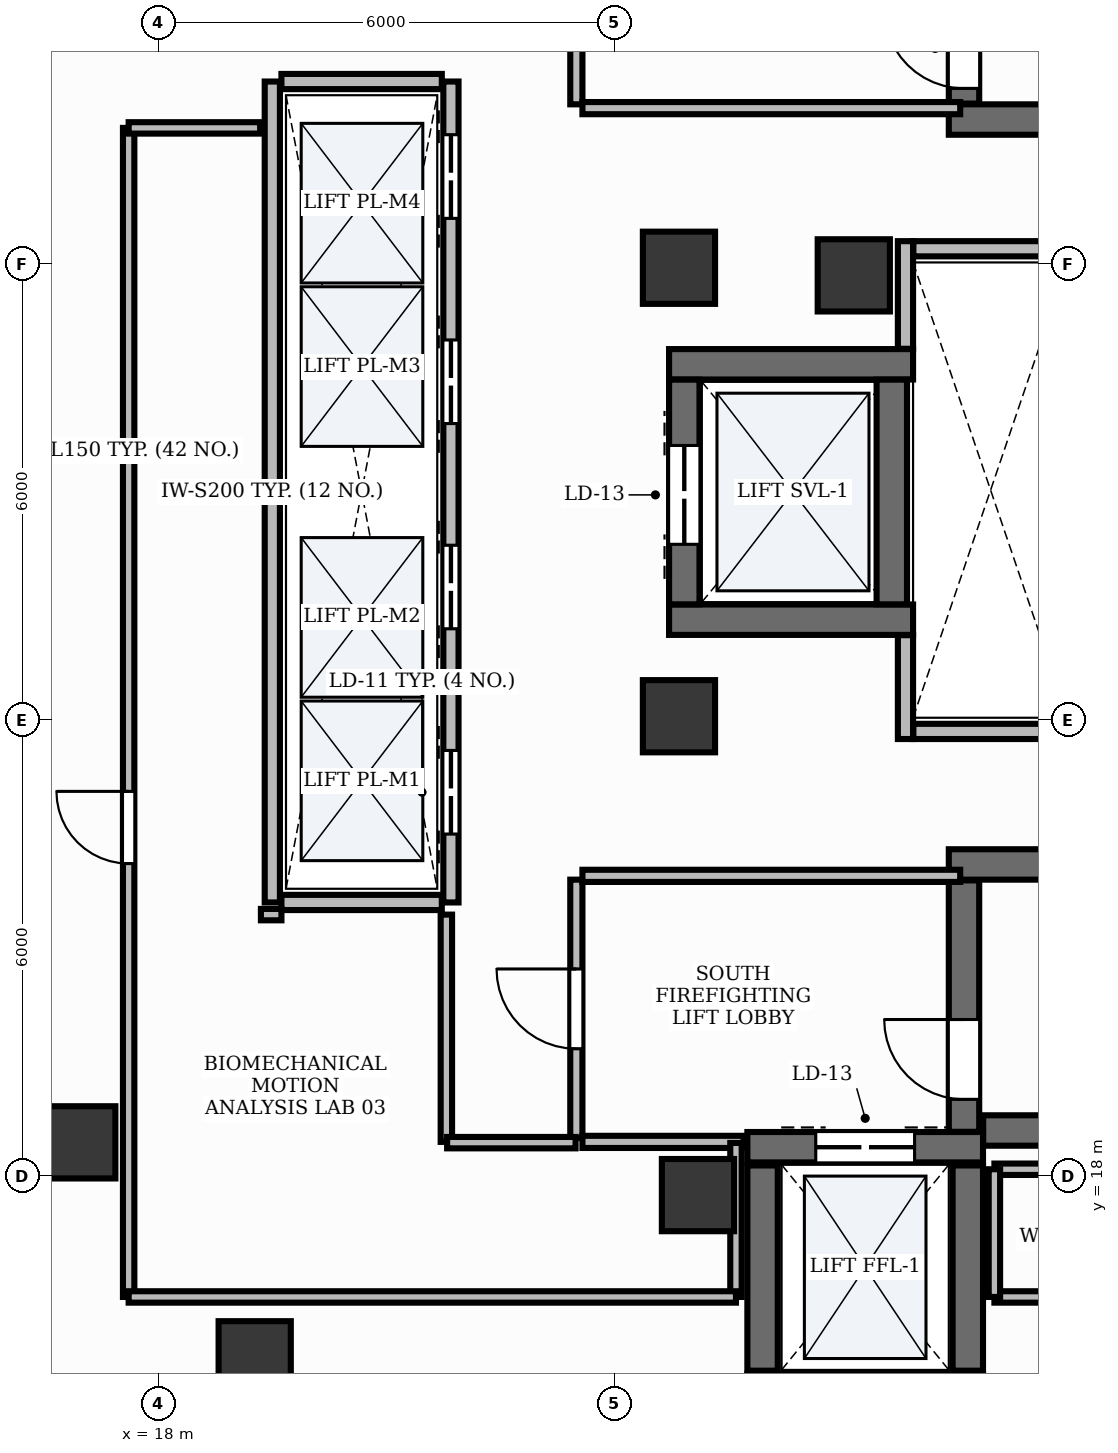
"""IFC4 building model, lengths in metres.
Left out: names, types, materials, properties, quantities, classifications, styles, units other than length and angle.
Written with IfcOpenShell. Run it as: python <this file> out.ifc"""

import sys

from ifc_helpers import new_model, si_unit, direction, frame, frame_2d, origin, origin_2d, place, context, subcontext, project, spatial, rectangle, extrude, element, fill, save


model = new_model("IFC4")
c1 = context("Model", 3, precision=1e-05, world=origin(), true_north=direction((0.0, 1.0)))
c2 = subcontext(c1, "Body", "Model", "MODEL_VIEW")
j1 = project(units=[si_unit("LENGTHUNIT", "METRE"), si_unit("PLANEANGLEUNIT", "RADIAN")], contexts=[c1])
p1 = place(None, origin())
s1 = spatial("IfcSite", under=j1, at=p1, CompositionType="ELEMENT")
p2 = place(p1, origin())
s2 = spatial("IfcBuilding", under=s1, at=p2, CompositionType="ELEMENT")
p3 = place(p2, frame((0.0, 0.0, 239.4)))
s3 = spatial("IfcBuildingStorey", under=s2, at=p3, CompositionType="ELEMENT", Elevation=239.4)
p4 = place(p3, frame((28.4, 31.9, 0.0), z_axis=(0.0, 0.0, 1.0), x_axis=(1.0, 0.0, 0.0)))
e1 = element("IfcWall", 1, at=p4, inside=s3, PredefinedType="SHEAR", context=c2, shape_type="SweptSolid", body=[
    extrude(rectangle(XDim=8.65, YDim=0.4, at=frame_2d((4.325, 0.0))), origin(), (0.0, 0.0, 1.0), 3.9),
])
p5 = place(p3, frame((28.6, 32.11, 0.0), z_axis=(0.0, 0.0, 1.0), x_axis=(0.0, 1.0, 0.0)))
e2 = element("IfcWall", 2, at=p5, inside=s3, PredefinedType="SHEAR", context=c2, shape_type="SweptSolid", body=[
    extrude(rectangle(XDim=3.308, YDim=0.4, at=frame_2d((1.654, 0.0))), origin(), (0.0, 0.0, 1.0), 3.9),
])
p6 = place(p5, frame((0.2, 0.0, 0.0)))
e3 = element("IfcOpeningElement", 3, at=p6, cuts=e2, PredefinedType="OPENING", context=c2, shape_type="SweptSolid", body=[
    extrude(rectangle(XDim=1.05, YDim=2.15, at=frame_2d((0.525, 1.075))), frame((0.0, 0.215, 0.0), z_axis=(0.0, -1.0, 0.0), x_axis=(1.0, 0.0, 0.0)), (0.0, 0.0, 1.0), 0.43),
])
p7 = place(p3, frame((28.852, 18.6, 0.0), z_axis=(0.0, 0.0, 1.0), x_axis=(1.0, 0.0, 0.0)))
e4 = element("IfcWall", 4, at=p7, inside=s3, PredefinedType="SHEAR", context=c2, shape_type="SweptSolid", body=[
    extrude(rectangle(XDim=8.198, YDim=0.4, at=frame_2d((4.099, 0.0))), origin(), (0.0, 0.0, 1.0), 3.9),
])
p8 = place(p3, frame((28.4, 22.1, 0.0), z_axis=(0.0, 0.0, 1.0), x_axis=(1.0, 0.0, 0.0)))
e5 = element("IfcWall", 5, at=p8, inside=s3, PredefinedType="SHEAR", context=c2, shape_type="SweptSolid", body=[
    extrude(rectangle(XDim=8.65, YDim=0.4, at=frame_2d((4.325, 0.0))), origin(), (0.0, 0.0, 1.0), 3.9),
])
p9 = place(p3, frame((28.6, 18.582, 0.0), z_axis=(0.0, 0.0, 1.0), x_axis=(0.0, 1.0, 0.0)))
e6 = element("IfcWall", 6, at=p9, inside=s3, PredefinedType="SHEAR", context=c2, shape_type="SweptSolid", body=[
    extrude(rectangle(XDim=3.308, YDim=0.4, at=frame_2d((1.654, 0.0))), origin(), (0.0, 0.0, 1.0), 3.9),
])
p10 = place(p9, frame((0.428, 0.0, 0.0)))
e7 = element("IfcOpeningElement", 7, at=p10, cuts=e6, PredefinedType="OPENING", context=c2, shape_type="SweptSolid", body=[
    extrude(rectangle(XDim=1.05, YDim=2.15, at=frame_2d((0.525, 1.075))), frame((0.0, 0.215, 0.0), z_axis=(0.0, -1.0, 0.0), x_axis=(1.0, 0.0, 0.0)), (0.0, 0.0, 1.0), 0.43),
])
p11 = place(p3, frame((25.75, 18.38, 0.0), z_axis=(0.0, 0.0, 1.0), x_axis=(1.0, 0.0, 0.0)))
e8 = element("IfcWall", 8, at=p11, inside=s3, PredefinedType="SHEAR", context=c2, shape_type="SweptSolid", body=[
    extrude(rectangle(XDim=3.1, YDim=0.4, at=frame_2d((1.55, 0.0))), origin(), (0.0, 0.0, 1.0), 3.9),
])
p12 = place(p11, frame((0.9, 0.0, 0.0)))
e9 = element("IfcOpeningElement", 9, at=p12, cuts=e8, PredefinedType="OPENING", context=c2, shape_type="SweptSolid", body=[
    extrude(rectangle(XDim=1.3, YDim=2.2, at=frame_2d((0.65, 1.1))), frame((0.0, 0.215, 0.0), z_axis=(0.0, -1.0, 0.0), x_axis=(1.0, 0.0, 0.0)), (0.0, 0.0, 1.0), 0.43),
])
for number, where, z_axis, x_axis in (
    (10, (25.95, 15.44, 0.0), (0.0, 0.0, 1.0), (0.0, 1.0, 0.0)),
    (11, (28.65, 15.44, 0.0), (0.0, 0.0, 1.0), (0.0, 1.0, 0.0)),
):
    element("IfcWall", number, at=place(p3, frame(where, z_axis=z_axis, x_axis=x_axis)), inside=s3, PredefinedType="SHEAR", context=c2, shape_type="SweptSolid", body=[
        extrude(rectangle(XDim=2.7, YDim=0.4, at=frame_2d((1.35, 0.0))), origin(), (0.0, 0.0, 1.0), 3.9),
    ])
for number, where, z_axis, x_axis in (
    (12, (24.72, 28.68, 0.0), (0.0, 0.0, 1.0), (1.0, 0.0, 0.0)),
    (13, (24.72, 25.32, 0.0), (0.0, 0.0, 1.0), (1.0, 0.0, 0.0)),
):
    element("IfcWall", number, at=place(p3, frame(where, z_axis=z_axis, x_axis=x_axis)), inside=s3, PredefinedType="SHEAR", context=c2, shape_type="SweptSolid", body=[
        extrude(rectangle(XDim=3.21, YDim=0.4, at=frame_2d((1.605, 0.0))), origin(), (0.0, 0.0, 1.0), 3.9),
    ])
p13 = place(p3, frame((24.92, 25.522, 0.0), z_axis=(0.0, 0.0, 1.0), x_axis=(0.0, 1.0, 0.0)))
e14 = element("IfcWall", 14, at=p13, inside=s3, PredefinedType="SHEAR", context=c2, shape_type="SweptSolid", body=[
    extrude(rectangle(XDim=2.956, YDim=0.4, at=frame_2d((1.478, 0.0))), origin(), (0.0, 0.0, 1.0), 3.9),
])
p14 = place(p13, frame((0.79, 0.0, 0.0)))
e15 = element("IfcOpeningElement", 15, at=p14, cuts=e14, PredefinedType="OPENING", context=c2, shape_type="SweptSolid", body=[
    extrude(rectangle(XDim=1.3, YDim=2.2, at=frame_2d((0.65, 1.1))), frame((0.0, 0.215, 0.0), z_axis=(0.0, -1.0, 0.0), x_axis=(1.0, 0.0, 0.0)), (0.0, 0.0, 1.0), 0.43),
])
p15 = place(p3, frame((27.65, 25.522, 0.0), z_axis=(0.0, 0.0, 1.0), x_axis=(0.0, 1.0, 0.0)))
e16 = element("IfcWall", 16, at=p15, inside=s3, PredefinedType="SHEAR", context=c2, shape_type="SweptSolid", body=[
    extrude(rectangle(XDim=2.956, YDim=0.4, at=frame_2d((1.478, 0.0))), origin(), (0.0, 0.0, 1.0), 3.9),
])
for number, where, z_axis, x_axis in (
    (17, (24.85, 29.95, -0.0), (0.0, 0.0, 1.0), (1.0, 0.0, 0.0)),
    (18, (27.15, 29.85, -0.0), (0.0, 0.0, 1.0), (1.0, 0.0, 0.0)),
    (19, (24.85, 24.05, -0.0), (0.0, 0.0, 1.0), (1.0, 0.0, 0.0)),
    (20, (25.1, 17.75, -0.0), (0.0, 0.0, 1.0), (1.0, 0.0, 0.0)),
):
    element("IfcColumn", number, at=place(p3, frame(where, z_axis=z_axis, x_axis=x_axis)), inside=s3, PredefinedType="PILASTER", context=c2, shape_type="SweptSolid", body=[
        extrude(rectangle(XDim=0.95, YDim=0.95, at=origin_2d()), origin(), (0.0, 0.0, 1.0), 3.901),
    ])
for number, where, z_axis, x_axis in (
    (21, (16.96, 18.444, -0.0), (0.0, 0.0, 1.0), (1.0, 0.0, 0.0)),
    (22, (19.268, 15.616, -0.0), (0.0, 0.0, 1.0), (1.0, 0.0, 0.0)),
):
    element("IfcColumn", number, at=place(p3, frame(where, z_axis=z_axis, x_axis=x_axis)), inside=s3, PredefinedType="COLUMN", context=c2, shape_type="SweptSolid", body=[
        extrude(rectangle(XDim=0.95, YDim=0.95, at=origin_2d()), origin(), (0.0, 0.0, 1.0), 3.901),
    ])
p16 = place(p3, frame((19.5, 21.6, 0.0), z_axis=(0.0, 0.0, 1.0), x_axis=(0.0, 1.0, 0.0)))
e23 = element("IfcWall", 23, at=p16, inside=s3, PredefinedType="PARTITIONING", context=c2, shape_type="SweptSolid", body=[
    extrude(rectangle(XDim=10.8, YDim=0.2, at=frame_2d((5.4, 0.0))), origin(), (0.0, 0.0, 1.0), 2.22),
])
p17 = place(p3, frame((21.85, 21.6, 0.0), z_axis=(0.0, 0.0, 1.0), x_axis=(0.0, 1.0, 0.0)))
e24 = element("IfcWall", 24, at=p17, inside=s3, PredefinedType="PARTITIONING", context=c2, shape_type="SweptSolid", body=[
    extrude(rectangle(XDim=10.8, YDim=0.2, at=frame_2d((5.4, 0.0))), origin(), (0.0, 0.0, 1.0), 2.22),
])
p18 = place(p17, frame((0.9, 0.0, 0.0)))
e25 = element("IfcOpeningElement", 25, at=p18, cuts=e24, PredefinedType="OPENING", context=c2, shape_type="SweptSolid", body=[
    extrude(rectangle(XDim=1.1, YDim=2.2, at=frame_2d((0.55, 1.1))), frame((0.0, 0.115, 0.0), z_axis=(0.0, -1.0, 0.0), x_axis=(1.0, 0.0, 0.0)), (0.0, 0.0, 1.0), 0.23),
])
p19 = place(p17, frame((3.6, 0.0, 0.0)))
e26 = element("IfcOpeningElement", 26, at=p19, cuts=e24, PredefinedType="OPENING", context=c2, shape_type="SweptSolid", body=[
    extrude(rectangle(XDim=1.1, YDim=2.2, at=frame_2d((0.55, 1.1))), frame((0.0, 0.115, 0.0), z_axis=(0.0, -1.0, 0.0), x_axis=(1.0, 0.0, 0.0)), (0.0, 0.0, 1.0), 0.23),
])
p20 = place(p17, frame((6.3, 0.0, 0.0)))
e27 = element("IfcOpeningElement", 27, at=p20, cuts=e24, PredefinedType="OPENING", context=c2, shape_type="SweptSolid", body=[
    extrude(rectangle(XDim=1.1, YDim=2.2, at=frame_2d((0.55, 1.1))), frame((0.0, 0.115, 0.0), z_axis=(0.0, -1.0, 0.0), x_axis=(1.0, 0.0, 0.0)), (0.0, 0.0, 1.0), 0.23),
])
p21 = place(p17, frame((9.0, 0.0, 0.0)))
e28 = element("IfcOpeningElement", 28, at=p21, cuts=e24, PredefinedType="OPENING", context=c2, shape_type="SweptSolid", body=[
    extrude(rectangle(XDim=1.1, YDim=2.2, at=frame_2d((0.55, 1.1))), frame((0.0, 0.115, 0.0), z_axis=(0.0, -1.0, 0.0), x_axis=(1.0, 0.0, 0.0)), (0.0, 0.0, 1.0), 0.23),
])
for number, where, z_axis, x_axis in (
    (29, (19.62, 21.6, 0.0), (0.0, 0.0, 1.0), (1.0, 0.0, 0.0)),
    (30, (19.62, 32.4, 0.0), (0.0, 0.0, 1.0), (1.0, 0.0, 0.0)),
):
    element("IfcWall", number, at=place(p3, frame(where, z_axis=z_axis, x_axis=x_axis)), inside=s3, PredefinedType="PARTITIONING", context=c2, shape_type="SweptSolid", body=[
        extrude(rectangle(XDim=2.11, YDim=0.2, at=frame_2d((1.055, 0.0))), origin(), (0.0, 0.0, 1.0), 2.22),
    ])
p22 = place(p3, frame((27.83, 23.75, 0.0), z_axis=(0.0, 0.0, 1.0), x_axis=(0.0, 1.0, 0.0)))
e31 = element("IfcWall", 31, at=p22, inside=s3, PredefinedType="PARTITIONING", context=c2, shape_type="SweptSolid", body=[
    extrude(rectangle(XDim=1.366, YDim=0.2, at=frame_2d((0.683, 0.0))), origin(), (0.0, 0.0, 1.0), 2.22),
])
p23 = place(p3, frame((27.83, 28.884, 0.0), z_axis=(0.0, 0.0, 1.0), x_axis=(0.0, 1.0, 0.0)))
e32 = element("IfcWall", 32, at=p23, inside=s3, PredefinedType="PARTITIONING", context=c2, shape_type="SweptSolid", body=[
    extrude(rectangle(XDim=1.416, YDim=0.2, at=frame_2d((0.708, 0.0))), origin(), (0.0, 0.0, 1.0), 2.22),
])
for number, where, z_axis, x_axis in (
    (33, (27.934, 23.85, 0.0), (0.0, 0.0, 1.0), (1.0, 0.0, 0.0)),
    (34, (27.934, 30.2, 0.0), (0.0, 0.0, 1.0), (1.0, 0.0, 0.0)),
):
    element("IfcWall", number, at=place(p3, frame(where, z_axis=z_axis, x_axis=x_axis)), inside=s3, PredefinedType="PARTITIONING", context=c2, shape_type="SweptSolid", body=[
        extrude(rectangle(XDim=2.096, YDim=0.2, at=frame_2d((1.048, 0.0))), origin(), (0.0, 0.0, 1.0), 2.22),
    ])
p24 = place(p3, frame((23.5, 32.1, 0.0), z_axis=(0.0, 0.0, 1.0), x_axis=(0.0, 1.0, 0.0)))
e35 = element("IfcWall", 35, at=p24, inside=s3, PredefinedType="PARTITIONING", context=c2, shape_type="SweptSolid", body=[
    extrude(rectangle(XDim=3.4, YDim=0.16, at=frame_2d((1.7, 0.0))), origin(), (0.0, 0.0, 1.0), 2.22),
])
p25 = place(p24, frame((1.175, 0.0, 0.0)))
e36 = element("IfcOpeningElement", 36, at=p25, cuts=e35, PredefinedType="OPENING", context=c2, shape_type="SweptSolid", body=[
    extrude(rectangle(XDim=1.05, YDim=2.15, at=frame_2d((0.525, 1.075))), frame((0.0, 0.095, 0.0), z_axis=(0.0, -1.0, 0.0), x_axis=(1.0, 0.0, 0.0)), (0.0, 0.0, 1.0), 0.19),
])
p26 = place(p3, frame((23.5, 18.5, 0.0), z_axis=(0.0, 0.0, 1.0), x_axis=(0.0, 1.0, 0.0)))
e37 = element("IfcWall", 37, at=p26, inside=s3, PredefinedType="PARTITIONING", context=c2, shape_type="SweptSolid", body=[
    extrude(rectangle(XDim=3.4, YDim=0.16, at=frame_2d((1.7, 0.0))), origin(), (0.0, 0.0, 1.0), 2.22),
])
p27 = place(p26, frame((1.175, 0.0, 0.0)))
e38 = element("IfcOpeningElement", 38, at=p27, cuts=e37, PredefinedType="OPENING", context=c2, shape_type="SweptSolid", body=[
    extrude(rectangle(XDim=1.05, YDim=2.15, at=frame_2d((0.525, 1.075))), frame((0.0, 0.095, 0.0), z_axis=(0.0, -1.0, 0.0), x_axis=(1.0, 0.0, 0.0)), (0.0, 0.0, 1.0), 0.19),
])
for number, where, z_axis, x_axis in (
    (39, (23.58, 32.05, 0.0), (0.0, 0.0, 1.0), (1.0, 0.0, 0.0)),
    (40, (23.58, 21.95, 0.0), (0.0, 0.0, 1.0), (1.0, 0.0, 0.0)),
):
    element("IfcWall", number, at=place(p3, frame(where, z_axis=z_axis, x_axis=x_axis)), inside=s3, PredefinedType="PARTITIONING", context=c2, shape_type="SweptSolid", body=[
        extrude(rectangle(XDim=4.97, YDim=0.16, at=frame_2d((2.485, 0.0))), origin(), (0.0, 0.0, 1.0), 2.22),
    ])
p28 = place(p3, frame((23.58, 18.45, 0.0), z_axis=(0.0, 0.0, 1.0), x_axis=(1.0, 0.0, 0.0)))
e41 = element("IfcWall", 41, at=p28, inside=s3, PredefinedType="PARTITIONING", context=c2, shape_type="SweptSolid", body=[
    extrude(rectangle(XDim=2.12, YDim=0.16, at=frame_2d((1.06, 0.0))), origin(), (0.0, 0.0, 1.0), 2.22),
])
p29 = place(p3, frame((17.61, 16.41, 0.0), z_axis=(0.0, 0.0, 1.0), x_axis=(0.0, 1.0, 0.0)))
e42 = element("IfcWall", 42, at=p29, inside=s3, PredefinedType="PARTITIONING", context=c2, shape_type="SweptSolid", body=[
    extrude(rectangle(XDim=15.38, YDim=0.15, at=frame_2d((7.69, 0.0))), origin(), (0.0, 0.0, 1.0), 2.22),
])
p30 = place(p29, frame((5.701, 0.0, 0.0)))
e43 = element("IfcOpeningElement", 43, at=p30, cuts=e42, PredefinedType="OPENING", context=c2, shape_type="SweptSolid", body=[
    extrude(rectangle(XDim=0.95, YDim=2.15, at=frame_2d((0.475, 1.075))), frame((0.0, 0.09, 0.0), z_axis=(0.0, -1.0, 0.0), x_axis=(1.0, 0.0, 0.0)), (0.0, 0.0, 1.0), 0.18),
])
p31 = place(p3, frame((35.598, 16.41, 0.0), z_axis=(0.0, 0.0, 1.0), x_axis=(-1.0, 0.0, 0.0)))
e44 = element("IfcWall", 44, at=p31, inside=s3, PredefinedType="PARTITIONING", context=c2, shape_type="SweptSolid", body=[
    extrude(rectangle(XDim=6.598, YDim=0.15, at=frame_2d((3.299, 0.0))), origin(), (0.0, 0.0, 1.0), 2.22),
])
p32 = place(p31, frame((1.427, 0.0, 0.0)))
e45 = element("IfcOpeningElement", 45, at=p32, cuts=e44, PredefinedType="OPENING", context=c2, shape_type="SweptSolid", body=[
    extrude(rectangle(XDim=0.95, YDim=2.15, at=frame_2d((0.475, 1.075))), frame((0.0, 0.09, 0.0), z_axis=(0.0, -1.0, 0.0), x_axis=(1.0, 0.0, 0.0)), (0.0, 0.0, 1.0), 0.18),
])
p33 = place(p3, frame((19.35, 21.44, 0.0), z_axis=(0.0, 0.0, 1.0), x_axis=(1.0, 0.0, 0.0)))
e46 = element("IfcWall", 46, at=p33, inside=s3, PredefinedType="PARTITIONING", context=c2, shape_type="SweptSolid", body=[
    extrude(rectangle(XDim=0.27, YDim=0.15, at=frame_2d((0.135, 0.0))), origin(), (0.0, 0.0, 1.0), 2.22),
])
p34 = place(p3, frame((21.79, 21.44, 0.0), z_axis=(0.0, 0.0, 1.0), x_axis=(0.0, -1.0, 0.0)))
e47 = element("IfcWall", 47, at=p34, inside=s3, PredefinedType="PARTITIONING", context=c2, shape_type="SweptSolid", body=[
    extrude(rectangle(XDim=2.99, YDim=0.15, at=frame_2d((1.495, 0.0))), origin(), (0.0, 0.0, 1.0), 2.22),
])
p35 = place(p3, frame((21.8, 18.44, 0.0), z_axis=(0.0, 0.0, 1.0), x_axis=(1.0, 0.0, 0.0)))
e48 = element("IfcWall", 48, at=p35, inside=s3, PredefinedType="PARTITIONING", context=c2, shape_type="SweptSolid", body=[
    extrude(rectangle(XDim=1.69, YDim=0.15, at=frame_2d((0.845, 0.0))), origin(), (0.0, 0.0, 1.0), 2.22),
])
p36 = place(p3, frame((25.6, 18.436, 0.0), z_axis=(0.0, 0.0, 1.0), x_axis=(0.0, -1.0, 0.0)))
e49 = element("IfcWall", 49, at=p36, inside=s3, PredefinedType="PARTITIONING", context=c2, shape_type="SweptSolid", body=[
    extrude(rectangle(XDim=2.026, YDim=0.15, at=frame_2d((1.013, 0.0))), origin(), (0.0, 0.0, 1.0), 2.22),
])
p37 = place(p3, frame((25.6, 16.41, 0.0), z_axis=(0.0, 0.0, 1.0), x_axis=(-1.0, 0.0, 0.0)))
e50 = element("IfcWall", 50, at=p37, inside=s3, PredefinedType="PARTITIONING", context=c2, shape_type="SweptSolid", body=[
    extrude(rectangle(XDim=7.99, YDim=0.15, at=frame_2d((3.995, 0.0))), origin(), (0.0, 0.0, 1.0), 2.22),
])
p38 = place(p3, frame((17.61, 31.79, 0.0), z_axis=(0.0, 0.0, 1.0), x_axis=(1.0, 0.0, 0.0)))
e51 = element("IfcWall", 51, at=p38, inside=s3, PredefinedType="PARTITIONING", context=c2, shape_type="SweptSolid", body=[
    extrude(rectangle(XDim=1.73, YDim=0.15, at=frame_2d((0.865, 0.0))), origin(), (0.0, 0.0, 1.0), 2.22),
])
p39 = place(p3, frame((29.0, 18.09, 0.0), z_axis=(0.0, 0.0, 1.0), x_axis=(1.0, 0.0, 0.0)))
e52 = element("IfcWall", 52, at=p39, inside=s3, PredefinedType="PARTITIONING", context=c2, shape_type="SweptSolid", body=[
    extrude(rectangle(XDim=5.87, YDim=0.15, at=frame_2d((2.935, 0.0))), origin(), (0.0, 0.0, 1.0), 2.22),
])
p40 = place(p3, frame((29.0, 16.41, 0.0), z_axis=(0.0, 0.0, 1.0), x_axis=(0.0, 1.0, 0.0)))
e53 = element("IfcWall", 53, at=p40, inside=s3, PredefinedType="PARTITIONING", context=c2, shape_type="SweptSolid", body=[
    extrude(rectangle(XDim=1.68, YDim=0.15, at=frame_2d((0.84, 0.0))), origin(), (0.0, 0.0, 1.0), 2.22),
])
p41 = place(p6, origin())
e54 = element("IfcDoor", 54, at=p41, inside=s3, OperationType="SINGLE_SWING_RIGHT", PredefinedType="DOOR", context=c2, shape_type="SweptSolid", body=[
    extrude(rectangle(XDim=1.05, YDim=2.15, at=frame_2d((0.525, 1.075))), frame((0.0, 0.025, 0.0), z_axis=(0.0, -1.0, 0.0), x_axis=(1.0, 0.0, 0.0)), (0.0, 0.0, 1.0), 0.05),
])
fill(e3, e54)
p42 = place(p10, origin())
e55 = element("IfcDoor", 55, at=p42, inside=s3, OperationType="SINGLE_SWING_RIGHT", PredefinedType="DOOR", context=c2, shape_type="SweptSolid", body=[
    extrude(rectangle(XDim=1.05, YDim=2.15, at=frame_2d((0.525, 1.075))), frame((0.0, 0.025, 0.0), z_axis=(0.0, -1.0, 0.0), x_axis=(1.0, 0.0, 0.0)), (0.0, 0.0, 1.0), 0.05),
])
fill(e7, e55)
p43 = place(p18, origin())
e56 = element("IfcDoor", 56, at=p43, inside=s3, OperationType="DOUBLE_DOOR_SLIDING", PredefinedType="DOOR", context=c2, shape_type="SweptSolid", body=[
    extrude(rectangle(XDim=1.1, YDim=2.2, at=frame_2d((0.55, 1.1))), frame((0.0, 0.025, 0.0), z_axis=(0.0, -1.0, 0.0), x_axis=(1.0, 0.0, 0.0)), (0.0, 0.0, 1.0), 0.05),
])
fill(e25, e56)
p44 = place(p19, origin())
e57 = element("IfcDoor", 57, at=p44, inside=s3, OperationType="DOUBLE_DOOR_SLIDING", PredefinedType="DOOR", context=c2, shape_type="SweptSolid", body=[
    extrude(rectangle(XDim=1.1, YDim=2.2, at=frame_2d((0.55, 1.1))), frame((0.0, 0.025, 0.0), z_axis=(0.0, -1.0, 0.0), x_axis=(1.0, 0.0, 0.0)), (0.0, 0.0, 1.0), 0.05),
])
fill(e26, e57)
p45 = place(p20, origin())
e58 = element("IfcDoor", 58, at=p45, inside=s3, OperationType="DOUBLE_DOOR_SLIDING", PredefinedType="DOOR", context=c2, shape_type="SweptSolid", body=[
    extrude(rectangle(XDim=1.1, YDim=2.2, at=frame_2d((0.55, 1.1))), frame((0.0, 0.025, 0.0), z_axis=(0.0, -1.0, 0.0), x_axis=(1.0, 0.0, 0.0)), (0.0, 0.0, 1.0), 0.05),
])
fill(e27, e58)
p46 = place(p21, origin())
e59 = element("IfcDoor", 59, at=p46, inside=s3, OperationType="DOUBLE_DOOR_SLIDING", PredefinedType="DOOR", context=c2, shape_type="SweptSolid", body=[
    extrude(rectangle(XDim=1.1, YDim=2.2, at=frame_2d((0.55, 1.1))), frame((0.0, 0.025, 0.0), z_axis=(0.0, -1.0, 0.0), x_axis=(1.0, 0.0, 0.0)), (0.0, 0.0, 1.0), 0.05),
])
fill(e28, e59)
p47 = place(p12, origin())
e60 = element("IfcDoor", 60, at=p47, inside=s3, OperationType="DOUBLE_DOOR_SLIDING", PredefinedType="DOOR", context=c2, shape_type="SweptSolid", body=[
    extrude(rectangle(XDim=1.3, YDim=2.2, at=frame_2d((0.65, 1.1))), frame((0.0, 0.025, 0.0), z_axis=(0.0, -1.0, 0.0), x_axis=(1.0, 0.0, 0.0)), (0.0, 0.0, 1.0), 0.05),
])
fill(e9, e60)
p48 = place(p14, origin())
e61 = element("IfcDoor", 61, at=p48, inside=s3, OperationType="DOUBLE_DOOR_SLIDING", PredefinedType="DOOR", context=c2, shape_type="SweptSolid", body=[
    extrude(rectangle(XDim=1.3, YDim=2.2, at=frame_2d((0.65, 1.1))), frame((0.0, 0.025, 0.0), z_axis=(0.0, -1.0, 0.0), x_axis=(1.0, 0.0, 0.0)), (0.0, 0.0, 1.0), 0.05),
])
fill(e15, e61)
p49 = place(p27, origin())
e62 = element("IfcDoor", 62, at=p49, inside=s3, OperationType="SINGLE_SWING_RIGHT", PredefinedType="DOOR", context=c2, shape_type="SweptSolid", body=[
    extrude(rectangle(XDim=1.05, YDim=2.15, at=frame_2d((0.525, 1.075))), frame((0.0, 0.025, 0.0), z_axis=(0.0, -1.0, 0.0), x_axis=(1.0, 0.0, 0.0)), (0.0, 0.0, 1.0), 0.05),
])
fill(e38, e62)
p50 = place(p30, origin())
e63 = element("IfcDoor", 63, at=p50, inside=s3, OperationType="SINGLE_SWING_RIGHT", PredefinedType="DOOR", context=c2, shape_type="SweptSolid", body=[
    extrude(rectangle(XDim=0.95, YDim=2.15, at=frame_2d((0.475, 1.075))), frame((0.0, 0.025, 0.0), z_axis=(0.0, -1.0, 0.0), x_axis=(1.0, 0.0, 0.0)), (0.0, 0.0, 1.0), 0.05),
])
fill(e43, e63)
save(model, sys.argv[1])
